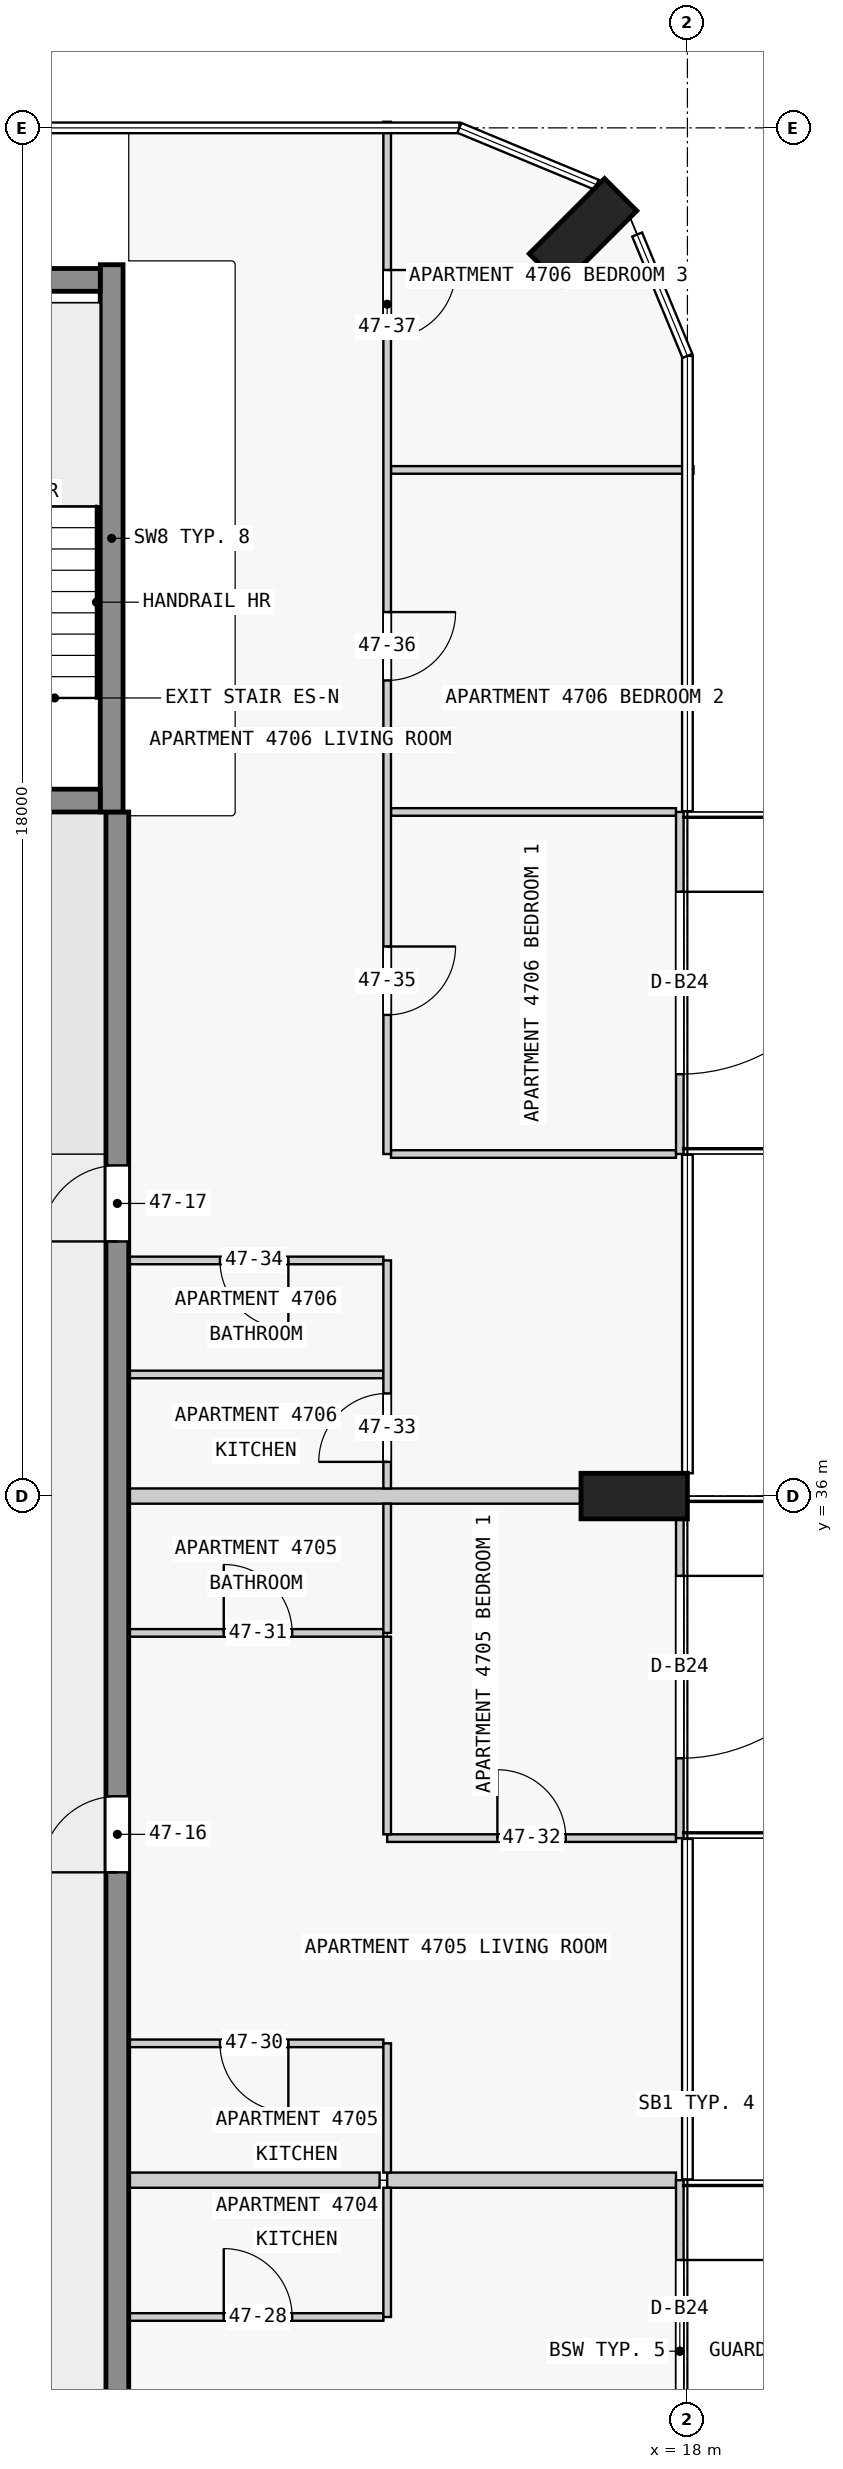
"""IFC4 building model, lengths in metres.
Left out: names, types, materials, properties, quantities, classifications, styles, units other than length and angle.
Written with IfcOpenShell. Run it as: python <this file> out.ifc"""

import sys

from ifc_helpers import new_model, si_unit, direction, frame, frame_2d, origin, origin_2d, place, context, subcontext, project, spatial, rectangle, extrude, element, fill, save


model = new_model("IFC4")
c1 = context("Model", 3, precision=1e-05, world=origin(), true_north=direction((0.0, 1.0)))
c2 = subcontext(c1, "Body", "Model", "MODEL_VIEW")
j1 = project(units=[si_unit("LENGTHUNIT", "METRE"), si_unit("PLANEANGLEUNIT", "RADIAN")], contexts=[c1])
p1 = place(None, origin())
s1 = spatial("IfcSite", under=j1, at=p1, CompositionType="ELEMENT")
p2 = place(p1, origin())
s2 = spatial("IfcBuilding", under=s1, at=p2, CompositionType="ELEMENT")
p3 = place(p2, frame((0.0, 0.0, 181.4)))
s3 = spatial("IfcBuildingStorey", under=s2, at=p3, CompositionType="ELEMENT", Elevation=181.4)
for number, where, z_axis, x_axis in (
    (1, (17.3, 36.0, 0.0), (0.0, 0.0, 1.0), (0.0, 1.0, 0.0)),
    (2, (16.626, 52.626, 0.0), (0.0, 0.0, 1.0), (-0.707, 0.707, 0.0)),
):
    element("IfcColumn", number, at=place(p3, frame(where, z_axis=z_axis, x_axis=x_axis)), inside=s3, PredefinedType="COLUMN", context=c2, shape_type="SweptSolid", body=[
        extrude(rectangle(XDim=0.6, YDim=1.4, at=origin_2d()), origin(), (0.0, 0.0, 1.0), 3.5),
    ])
p4 = place(p3, frame((7.725, 45.15, 0.0), z_axis=(0.0, 0.0, 1.0), x_axis=(1.0, 0.0, 0.0)))
e3 = element("IfcWall", 3, at=p4, inside=s3, PredefinedType="SHEAR", context=c2, shape_type="SweptSolid", body=[
    extrude(rectangle(XDim=2.55, YDim=0.3, at=frame_2d((1.275, 0.0))), origin(), (0.0, 0.0, 1.0), 3.5),
])
p5 = place(p4, frame((0.725, 0.0, 0.0)))
e4 = element("IfcOpeningElement", 4, at=p5, cuts=e3, PredefinedType="OPENING", context=c2, shape_type="SweptSolid", body=[
    extrude(rectangle(XDim=1.1, YDim=2.1, at=frame_2d((0.55, 1.05))), frame((0.0, 0.16, 0.0), z_axis=(0.0, -1.0, 0.0), x_axis=(1.0, 0.0, 0.0)), (0.0, 0.0, 1.0), 0.32),
])
p6 = place(p3, frame((7.725, 52.0, 0.0), z_axis=(0.0, 0.0, 1.0), x_axis=(1.0, 0.0, 0.0)))
e5 = element("IfcWall", 5, at=p6, inside=s3, PredefinedType="SHEAR", context=c2, shape_type="SweptSolid", body=[
    extrude(rectangle(XDim=2.55, YDim=0.3, at=frame_2d((1.275, 0.0))), origin(), (0.0, 0.0, 1.0), 3.5),
])
p7 = place(p3, frame((10.425, 45.0, 0.0), z_axis=(0.0, 0.0, 1.0), x_axis=(0.0, 1.0, 0.0)))
e6 = element("IfcWall", 6, at=p7, inside=s3, PredefinedType="SHEAR", context=c2, shape_type="SweptSolid", body=[
    extrude(rectangle(XDim=7.2, YDim=0.3, at=frame_2d((3.6, 0.0))), origin(), (0.0, 0.0, 1.0), 3.5),
])
p8 = place(p3, frame((10.5, 18.0, 0.0), z_axis=(0.0, 0.0, 1.0), x_axis=(0.0, 1.0, 0.0)))
e7 = element("IfcWall", 7, at=p8, inside=s3, PredefinedType="SHEAR", context=c2, shape_type="SweptSolid", body=[
    extrude(rectangle(XDim=27.0, YDim=0.3, at=frame_2d((13.5, 0.0))), origin(), (0.0, 0.0, 1.0), 3.2),
])
p9 = place(p8, frame((4.05, 0.0, 0.0)))
e8 = element("IfcOpeningElement", 8, at=p9, cuts=e7, PredefinedType="OPENING", context=c2, shape_type="SweptSolid", body=[
    extrude(rectangle(XDim=1.0, YDim=2.1, at=frame_2d((0.5, 1.05))), frame((0.0, 0.16, 0.0), z_axis=(0.0, -1.0, 0.0), x_axis=(1.0, 0.0, 0.0)), (0.0, 0.0, 1.0), 0.32),
])
p10 = place(p8, frame((13.05, 0.0, 0.0)))
e9 = element("IfcOpeningElement", 9, at=p10, cuts=e7, PredefinedType="OPENING", context=c2, shape_type="SweptSolid", body=[
    extrude(rectangle(XDim=1.0, YDim=2.1, at=frame_2d((0.5, 1.05))), frame((0.0, 0.16, 0.0), z_axis=(0.0, -1.0, 0.0), x_axis=(1.0, 0.0, 0.0)), (0.0, 0.0, 1.0), 0.32),
])
p11 = place(p8, frame((21.35, 0.0, 0.0)))
e10 = element("IfcOpeningElement", 10, at=p11, cuts=e7, PredefinedType="OPENING", context=c2, shape_type="SweptSolid", body=[
    extrude(rectangle(XDim=1.0, YDim=2.1, at=frame_2d((0.5, 1.05))), frame((0.0, 0.16, 0.0), z_axis=(0.0, -1.0, 0.0), x_axis=(1.0, 0.0, 0.0)), (0.0, 0.0, 1.0), 0.32),
])
p12 = place(p3, frame((17.9, 27.0, 0.0), z_axis=(0.0, 0.0, 1.0), x_axis=(0.0, -1.0, 0.0)))
e11 = element("IfcWall", 11, at=p12, inside=s3, PredefinedType="STANDARD", context=c2, shape_type="SweptSolid", body=[
    extrude(rectangle(XDim=4.5, YDim=0.1, at=frame_2d((2.25, 0.0))), origin(), (0.0, 0.0, 1.0), 3.2),
])
p13 = place(p12, frame((1.05, 0.0, 0.0)))
e12 = element("IfcOpeningElement", 12, at=p13, cuts=e11, PredefinedType="OPENING", context=c2, shape_type="SweptSolid", body=[
    extrude(rectangle(XDim=2.4, YDim=2.4, at=frame_2d((1.2, 1.2))), frame((0.0, 0.06, 0.0), z_axis=(0.0, -1.0, 0.0), x_axis=(1.0, 0.0, 0.0)), (0.0, 0.0, 1.0), 0.12),
])
p14 = place(p3, frame((17.9, 36.0, 0.0), z_axis=(0.0, 0.0, 1.0), x_axis=(0.0, -1.0, 0.0)))
e13 = element("IfcWall", 13, at=p14, inside=s3, PredefinedType="STANDARD", context=c2, shape_type="SweptSolid", body=[
    extrude(rectangle(XDim=4.5, YDim=0.1, at=frame_2d((2.25, 0.0))), origin(), (0.0, 0.0, 1.0), 3.2),
])
p15 = place(p14, frame((1.05, 0.0, 0.0)))
e14 = element("IfcOpeningElement", 14, at=p15, cuts=e13, PredefinedType="OPENING", context=c2, shape_type="SweptSolid", body=[
    extrude(rectangle(XDim=2.4, YDim=2.4, at=frame_2d((1.2, 1.2))), frame((0.0, 0.06, 0.0), z_axis=(0.0, -1.0, 0.0), x_axis=(1.0, 0.0, 0.0)), (0.0, 0.0, 1.0), 0.12),
])
p16 = place(p3, frame((17.9, 45.0, 0.0), z_axis=(0.0, 0.0, 1.0), x_axis=(0.0, -1.0, 0.0)))
e15 = element("IfcWall", 15, at=p16, inside=s3, PredefinedType="STANDARD", context=c2, shape_type="SweptSolid", body=[
    extrude(rectangle(XDim=4.5, YDim=0.1, at=frame_2d((2.25, 0.0))), origin(), (0.0, 0.0, 1.0), 3.2),
])
p17 = place(p16, frame((1.05, 0.0, 0.0)))
e16 = element("IfcOpeningElement", 16, at=p17, cuts=e15, PredefinedType="OPENING", context=c2, shape_type="SweptSolid", body=[
    extrude(rectangle(XDim=2.4, YDim=2.4, at=frame_2d((1.2, 1.2))), frame((0.0, 0.06, 0.0), z_axis=(0.0, -1.0, 0.0), x_axis=(1.0, 0.0, 0.0)), (0.0, 0.0, 1.0), 0.12),
])
p18 = place(p3, frame((10.65, 25.2, 0.0), z_axis=(0.0, 0.0, 1.0), x_axis=(1.0, 0.0, 0.0)))
e17 = element("IfcWall", 17, at=p18, inside=s3, PredefinedType="PARTITIONING", context=c2, shape_type="SweptSolid", body=[
    extrude(rectangle(XDim=3.35, YDim=0.1, at=frame_2d((1.675, 0.0))), origin(), (0.0, 0.0, 1.0), 3.2),
])
p19 = place(p18, frame((1.25, 0.0, 0.0)))
e18 = element("IfcOpeningElement", 18, at=p19, cuts=e17, PredefinedType="OPENING", context=c2, shape_type="SweptSolid", body=[
    extrude(rectangle(XDim=0.9, YDim=2.1, at=frame_2d((0.45, 1.05))), frame((0.0, 0.06, 0.0), z_axis=(0.0, -1.0, 0.0), x_axis=(1.0, 0.0, 0.0)), (0.0, 0.0, 1.0), 0.12),
])
p20 = place(p3, frame((13.95, 27.0, 0.0), z_axis=(0.0, 0.0, 1.0), x_axis=(-1.0, 0.0, 0.0)))
e19 = element("IfcWall", 19, at=p20, inside=s3, PredefinedType="PARTITIONING", context=c2, shape_type="SweptSolid", body=[
    extrude(rectangle(XDim=3.3, YDim=0.2, at=frame_2d((1.65, 0.0))), origin(), (0.0, 0.0, 1.0), 3.2),
])
p21 = place(p3, frame((14.05, 27.0, 0.0), z_axis=(0.0, 0.0, 1.0), x_axis=(1.0, 0.0, 0.0)))
e20 = element("IfcWall", 20, at=p21, inside=s3, PredefinedType="PARTITIONING", context=c2, shape_type="SweptSolid", body=[
    extrude(rectangle(XDim=3.8, YDim=0.2, at=frame_2d((1.9, 0.0))), origin(), (0.0, 0.0, 1.0), 3.2),
])
p22 = place(p3, frame((14.0, 28.8, 0.0), z_axis=(0.0, 0.0, 1.0), x_axis=(-1.0, 0.0, 0.0)))
e21 = element("IfcWall", 21, at=p22, inside=s3, PredefinedType="PARTITIONING", context=c2, shape_type="SweptSolid", body=[
    extrude(rectangle(XDim=3.35, YDim=0.1, at=frame_2d((1.675, 0.0))), origin(), (0.0, 0.0, 1.0), 3.2),
])
p23 = place(p22, frame((1.25, 0.0, 0.0)))
e22 = element("IfcOpeningElement", 22, at=p23, cuts=e21, PredefinedType="OPENING", context=c2, shape_type="SweptSolid", body=[
    extrude(rectangle(XDim=0.9, YDim=2.1, at=frame_2d((0.45, 1.05))), frame((0.0, 0.06, 0.0), z_axis=(0.0, -1.0, 0.0), x_axis=(1.0, 0.0, 0.0)), (0.0, 0.0, 1.0), 0.12),
])
p24 = place(p3, frame((14.05, 31.5, 0.0), z_axis=(0.0, 0.0, 1.0), x_axis=(1.0, 0.0, 0.0)))
e23 = element("IfcWall", 23, at=p24, inside=s3, PredefinedType="PARTITIONING", context=c2, shape_type="SweptSolid", body=[
    extrude(rectangle(XDim=3.8, YDim=0.1, at=frame_2d((1.9, 0.0))), origin(), (0.0, 0.0, 1.0), 3.2),
])
p25 = place(p24, frame((1.45, 0.0, 0.0)))
e24 = element("IfcOpeningElement", 24, at=p25, cuts=e23, PredefinedType="OPENING", context=c2, shape_type="SweptSolid", body=[
    extrude(rectangle(XDim=0.9, YDim=2.1, at=frame_2d((0.45, 1.05))), frame((0.0, 0.06, 0.0), z_axis=(0.0, -1.0, 0.0), x_axis=(1.0, 0.0, 0.0)), (0.0, 0.0, 1.0), 0.12),
])
p26 = place(p3, frame((10.65, 34.2, 0.0), z_axis=(0.0, 0.0, 1.0), x_axis=(1.0, 0.0, 0.0)))
e25 = element("IfcWall", 25, at=p26, inside=s3, PredefinedType="PARTITIONING", context=c2, shape_type="SweptSolid", body=[
    extrude(rectangle(XDim=3.35, YDim=0.1, at=frame_2d((1.675, 0.0))), origin(), (0.0, 0.0, 1.0), 3.2),
])
p27 = place(p26, frame((1.25, 0.0, 0.0)))
e26 = element("IfcOpeningElement", 26, at=p27, cuts=e25, PredefinedType="OPENING", context=c2, shape_type="SweptSolid", body=[
    extrude(rectangle(XDim=0.9, YDim=2.1, at=frame_2d((0.45, 1.05))), frame((0.0, 0.06, 0.0), z_axis=(0.0, -1.0, 0.0), x_axis=(1.0, 0.0, 0.0)), (0.0, 0.0, 1.0), 0.12),
])
p28 = place(p3, frame((16.6, 36.0, 0.0), z_axis=(0.0, 0.0, 1.0), x_axis=(-1.0, 0.0, 0.0)))
e27 = element("IfcWall", 27, at=p28, inside=s3, PredefinedType="PARTITIONING", context=c2, shape_type="SweptSolid", body=[
    extrude(rectangle(XDim=5.95, YDim=0.2, at=frame_2d((2.975, 0.0))), origin(), (0.0, 0.0, 1.0), 3.2),
])
p29 = place(p3, frame((14.0, 37.6, 0.0), z_axis=(0.0, 0.0, 1.0), x_axis=(-1.0, 0.0, 0.0)))
e28 = element("IfcWall", 28, at=p29, inside=s3, PredefinedType="PARTITIONING", context=c2, shape_type="SweptSolid", body=[
    extrude(rectangle(XDim=3.35, YDim=0.1, at=frame_2d((1.675, 0.0))), origin(), (0.0, 0.0, 1.0), 3.2),
])
p30 = place(p3, frame((14.0, 39.1, 0.0), z_axis=(0.0, 0.0, 1.0), x_axis=(-1.0, 0.0, 0.0)))
e29 = element("IfcWall", 29, at=p30, inside=s3, PredefinedType="PARTITIONING", context=c2, shape_type="SweptSolid", body=[
    extrude(rectangle(XDim=3.35, YDim=0.1, at=frame_2d((1.675, 0.0))), origin(), (0.0, 0.0, 1.0), 3.2),
])
p31 = place(p30, frame((1.25, 0.0, 0.0)))
e30 = element("IfcOpeningElement", 30, at=p31, cuts=e29, PredefinedType="OPENING", context=c2, shape_type="SweptSolid", body=[
    extrude(rectangle(XDim=0.9, YDim=2.1, at=frame_2d((0.45, 1.05))), frame((0.0, 0.06, 0.0), z_axis=(0.0, -1.0, 0.0), x_axis=(1.0, 0.0, 0.0)), (0.0, 0.0, 1.0), 0.12),
])
for number, where, z_axis, x_axis in (
    (31, (14.1, 40.5, 0.0), (0.0, 0.0, 1.0), (1.0, 0.0, 0.0)),
    (32, (17.85, 45.0, 0.0), (0.0, 0.0, 1.0), (-1.0, 0.0, 0.0)),
):
    element("IfcWall", number, at=place(p3, frame(where, z_axis=z_axis, x_axis=x_axis)), inside=s3, PredefinedType="PARTITIONING", context=c2, shape_type="SweptSolid", body=[
        extrude(rectangle(XDim=3.75, YDim=0.1, at=frame_2d((1.875, 0.0))), origin(), (0.0, 0.0, 1.0), 3.2),
    ])
p32 = place(p3, frame((18.08, 49.5, 0.0), z_axis=(0.0, 0.0, 1.0), x_axis=(-1.0, 0.0, 0.0)))
e33 = element("IfcWall", 33, at=p32, inside=s3, PredefinedType="PARTITIONING", context=c2, shape_type="SweptSolid", body=[
    extrude(rectangle(XDim=3.98, YDim=0.1, at=frame_2d((1.99, 0.0))), origin(), (0.0, 0.0, 1.0), 3.2),
])
p33 = place(p3, frame((14.05, 34.15, 0.0), z_axis=(0.0, 0.0, 1.0), x_axis=(0.0, -1.0, 0.0)))
e34 = element("IfcWall", 34, at=p33, inside=s3, PredefinedType="PARTITIONING", context=c2, shape_type="SweptSolid", body=[
    extrude(rectangle(XDim=2.6, YDim=0.1, at=frame_2d((1.3, 0.0))), origin(), (0.0, 0.0, 1.0), 3.2),
])
p34 = place(p3, frame((14.05, 54.08, 0.0), z_axis=(0.0, 0.0, 1.0), x_axis=(0.0, -1.0, 0.0)))
e35 = element("IfcWall", 35, at=p34, inside=s3, PredefinedType="PARTITIONING", context=c2, shape_type="SweptSolid", body=[
    extrude(rectangle(XDim=13.58, YDim=0.1, at=frame_2d((6.79, 0.0))), origin(), (0.0, 0.0, 1.0), 3.2),
])
p35 = place(p34, frame((10.85, 0.0, 0.0)))
e36 = element("IfcOpeningElement", 36, at=p35, cuts=e35, PredefinedType="OPENING", context=c2, shape_type="SweptSolid", body=[
    extrude(rectangle(XDim=0.9, YDim=2.1, at=frame_2d((0.45, 1.05))), frame((0.0, 0.06, 0.0), z_axis=(0.0, -1.0, 0.0), x_axis=(1.0, 0.0, 0.0)), (0.0, 0.0, 1.0), 0.12),
])
p36 = place(p34, frame((6.45, 0.0, 0.0)))
e37 = element("IfcOpeningElement", 37, at=p36, cuts=e35, PredefinedType="OPENING", context=c2, shape_type="SweptSolid", body=[
    extrude(rectangle(XDim=0.9, YDim=2.1, at=frame_2d((0.45, 1.05))), frame((0.0, 0.06, 0.0), z_axis=(0.0, -1.0, 0.0), x_axis=(1.0, 0.0, 0.0)), (0.0, 0.0, 1.0), 0.12),
])
p37 = place(p34, frame((1.95, 0.0, 0.0)))
e38 = element("IfcOpeningElement", 38, at=p37, cuts=e35, PredefinedType="OPENING", context=c2, shape_type="SweptSolid", body=[
    extrude(rectangle(XDim=0.9, YDim=2.1, at=frame_2d((0.45, 1.05))), frame((0.0, 0.06, 0.0), z_axis=(0.0, -1.0, 0.0), x_axis=(1.0, 0.0, 0.0)), (0.0, 0.0, 1.0), 0.12),
])
for number, where, z_axis, x_axis in (
    (39, (14.05, 25.2, 0.0), (0.0, 0.0, 1.0), (0.0, 1.0, 0.0)),
    (40, (14.05, 27.1, 0.0), (0.0, 0.0, 1.0), (0.0, 1.0, 0.0)),
    (41, (14.05, 34.2, 0.0), (0.0, 0.0, 1.0), (0.0, 1.0, 0.0)),
):
    element("IfcWall", number, at=place(p3, frame(where, z_axis=z_axis, x_axis=x_axis)), inside=s3, PredefinedType="PARTITIONING", context=c2, shape_type="SweptSolid", body=[
        extrude(rectangle(XDim=1.7, YDim=0.1, at=frame_2d((0.85, 0.0))), origin(), (0.0, 0.0, 1.0), 3.2),
    ])
p38 = place(p3, frame((14.05, 36.1, 0.0), z_axis=(0.0, 0.0, 1.0), x_axis=(0.0, 1.0, 0.0)))
e42 = element("IfcWall", 42, at=p38, inside=s3, PredefinedType="PARTITIONING", context=c2, shape_type="SweptSolid", body=[
    extrude(rectangle(XDim=3.0, YDim=0.1, at=frame_2d((1.5, 0.0))), origin(), (0.0, 0.0, 1.0), 3.2),
])
p39 = place(p38, frame((0.35, 0.0, 0.0)))
e43 = element("IfcOpeningElement", 43, at=p39, cuts=e42, PredefinedType="OPENING", context=c2, shape_type="SweptSolid", body=[
    extrude(rectangle(XDim=0.9, YDim=2.1, at=frame_2d((0.45, 1.05))), frame((0.0, 0.06, 0.0), z_axis=(0.0, -1.0, 0.0), x_axis=(1.0, 0.0, 0.0)), (0.0, 0.0, 1.0), 0.12),
])
p40 = place(p13, origin())
e44 = element("IfcDoor", 44, at=p40, inside=s3, OperationType="SINGLE_SWING_LEFT", PredefinedType="DOOR", context=c2, shape_type="SweptSolid", body=[
    extrude(rectangle(XDim=2.4, YDim=2.4, at=frame_2d((1.2, 1.2))), frame((0.0, 0.025, 0.0), z_axis=(0.0, -1.0, 0.0), x_axis=(1.0, 0.0, 0.0)), (0.0, 0.0, 1.0), 0.05),
])
fill(e12, e44)
p41 = place(p15, origin())
e45 = element("IfcDoor", 45, at=p41, inside=s3, OperationType="SINGLE_SWING_LEFT", PredefinedType="DOOR", context=c2, shape_type="SweptSolid", body=[
    extrude(rectangle(XDim=2.4, YDim=2.4, at=frame_2d((1.2, 1.2))), frame((0.0, 0.025, 0.0), z_axis=(0.0, -1.0, 0.0), x_axis=(1.0, 0.0, 0.0)), (0.0, 0.0, 1.0), 0.05),
])
fill(e14, e45)
p42 = place(p17, origin())
e46 = element("IfcDoor", 46, at=p42, inside=s3, OperationType="SINGLE_SWING_LEFT", PredefinedType="DOOR", context=c2, shape_type="SweptSolid", body=[
    extrude(rectangle(XDim=2.4, YDim=2.4, at=frame_2d((1.2, 1.2))), frame((0.0, 0.025, 0.0), z_axis=(0.0, -1.0, 0.0), x_axis=(1.0, 0.0, 0.0)), (0.0, 0.0, 1.0), 0.05),
])
fill(e16, e46)
p43 = place(p10, origin())
e47 = element("IfcDoor", 47, at=p43, inside=s3, OperationType="SINGLE_SWING_RIGHT", PredefinedType="DOOR", context=c2, shape_type="SweptSolid", body=[
    extrude(rectangle(XDim=1.0, YDim=2.1, at=frame_2d((0.5, 1.05))), frame((0.0, 0.025, 0.0), z_axis=(0.0, -1.0, 0.0), x_axis=(1.0, 0.0, 0.0)), (0.0, 0.0, 1.0), 0.05),
])
fill(e9, e47)
p44 = place(p11, origin())
e48 = element("IfcDoor", 48, at=p44, inside=s3, OperationType="SINGLE_SWING_RIGHT", PredefinedType="DOOR", context=c2, shape_type="SweptSolid", body=[
    extrude(rectangle(XDim=1.0, YDim=2.1, at=frame_2d((0.5, 1.05))), frame((0.0, 0.025, 0.0), z_axis=(0.0, -1.0, 0.0), x_axis=(1.0, 0.0, 0.0)), (0.0, 0.0, 1.0), 0.05),
])
fill(e10, e48)
p45 = place(p19, origin())
e49 = element("IfcDoor", 49, at=p45, inside=s3, OperationType="SINGLE_SWING_RIGHT", PredefinedType="DOOR", context=c2, shape_type="SweptSolid", body=[
    extrude(rectangle(XDim=0.9, YDim=2.1, at=frame_2d((0.45, 1.05))), frame((0.0, 0.025, 0.0), z_axis=(0.0, -1.0, 0.0), x_axis=(1.0, 0.0, 0.0)), (0.0, 0.0, 1.0), 0.05),
])
fill(e18, e49)
p46 = place(p23, origin())
e50 = element("IfcDoor", 50, at=p46, inside=s3, OperationType="SINGLE_SWING_RIGHT", PredefinedType="DOOR", context=c2, shape_type="SweptSolid", body=[
    extrude(rectangle(XDim=0.9, YDim=2.1, at=frame_2d((0.45, 1.05))), frame((0.0, 0.025, 0.0), z_axis=(0.0, -1.0, 0.0), x_axis=(1.0, 0.0, 0.0)), (0.0, 0.0, 1.0), 0.05),
])
fill(e22, e50)
p47 = place(p27, origin())
e51 = element("IfcDoor", 51, at=p47, inside=s3, OperationType="SINGLE_SWING_RIGHT", PredefinedType="DOOR", context=c2, shape_type="SweptSolid", body=[
    extrude(rectangle(XDim=0.9, YDim=2.1, at=frame_2d((0.45, 1.05))), frame((0.0, 0.025, 0.0), z_axis=(0.0, -1.0, 0.0), x_axis=(1.0, 0.0, 0.0)), (0.0, 0.0, 1.0), 0.05),
])
fill(e26, e51)
p48 = place(p25, origin())
e52 = element("IfcDoor", 52, at=p48, inside=s3, OperationType="SINGLE_SWING_LEFT", PredefinedType="DOOR", context=c2, shape_type="SweptSolid", body=[
    extrude(rectangle(XDim=0.9, YDim=2.1, at=frame_2d((0.45, 1.05))), frame((0.0, 0.025, 0.0), z_axis=(0.0, -1.0, 0.0), x_axis=(1.0, 0.0, 0.0)), (0.0, 0.0, 1.0), 0.05),
])
fill(e24, e52)
p49 = place(p39, origin())
e53 = element("IfcDoor", 53, at=p49, inside=s3, OperationType="SINGLE_SWING_LEFT", PredefinedType="DOOR", context=c2, shape_type="SweptSolid", body=[
    extrude(rectangle(XDim=0.9, YDim=2.1, at=frame_2d((0.45, 1.05))), frame((0.0, 0.025, 0.0), z_axis=(0.0, -1.0, 0.0), x_axis=(1.0, 0.0, 0.0)), (0.0, 0.0, 1.0), 0.05),
])
fill(e43, e53)
p50 = place(p31, origin())
e54 = element("IfcDoor", 54, at=p50, inside=s3, OperationType="SINGLE_SWING_RIGHT", PredefinedType="DOOR", context=c2, shape_type="SweptSolid", body=[
    extrude(rectangle(XDim=0.9, YDim=2.1, at=frame_2d((0.45, 1.05))), frame((0.0, 0.025, 0.0), z_axis=(0.0, -1.0, 0.0), x_axis=(1.0, 0.0, 0.0)), (0.0, 0.0, 1.0), 0.05),
])
fill(e30, e54)
p51 = place(p35, origin())
e55 = element("IfcDoor", 55, at=p51, inside=s3, OperationType="SINGLE_SWING_RIGHT", PredefinedType="DOOR", context=c2, shape_type="SweptSolid", body=[
    extrude(rectangle(XDim=0.9, YDim=2.1, at=frame_2d((0.45, 1.05))), frame((0.0, 0.025, 0.0), z_axis=(0.0, -1.0, 0.0), x_axis=(1.0, 0.0, 0.0)), (0.0, 0.0, 1.0), 0.05),
])
fill(e36, e55)
p52 = place(p36, origin())
e56 = element("IfcDoor", 56, at=p52, inside=s3, OperationType="SINGLE_SWING_RIGHT", PredefinedType="DOOR", context=c2, shape_type="SweptSolid", body=[
    extrude(rectangle(XDim=0.9, YDim=2.1, at=frame_2d((0.45, 1.05))), frame((0.0, 0.025, 0.0), z_axis=(0.0, -1.0, 0.0), x_axis=(1.0, 0.0, 0.0)), (0.0, 0.0, 1.0), 0.05),
])
fill(e37, e56)
p53 = place(p37, origin())
e57 = element("IfcDoor", 57, at=p53, inside=s3, OperationType="SINGLE_SWING_LEFT", PredefinedType="DOOR", context=c2, shape_type="SweptSolid", body=[
    extrude(rectangle(XDim=0.9, YDim=2.1, at=frame_2d((0.45, 1.05))), frame((0.0, 0.025, 0.0), z_axis=(0.0, -1.0, 0.0), x_axis=(1.0, 0.0, 0.0)), (0.0, 0.0, 1.0), 0.05),
])
fill(e38, e57)
save(model, sys.argv[1])
